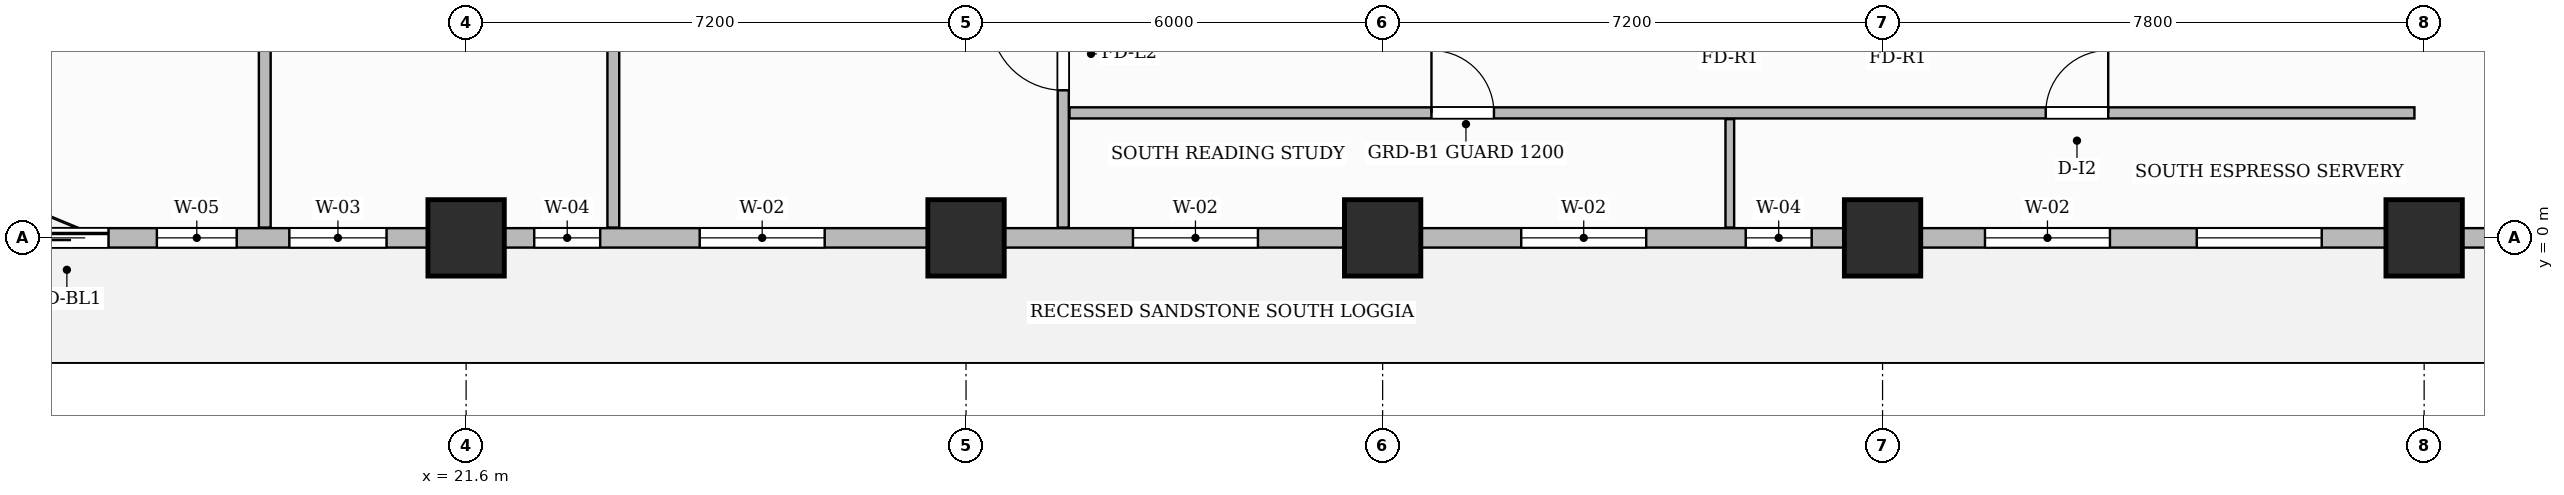
"""IFC4 building model, lengths in metres.
Left out: names, types, materials, properties, quantities, classifications, styles, units other than length and angle.
Written with IfcOpenShell. Run it as: python <this file> out.ifc"""

import sys

from ifc_helpers import new_model, si_unit, direction, frame, frame_2d, origin, origin_2d, place, context, subcontext, project, spatial, rectangle, extrude, source, transform, mapped, element, fill, save


model = new_model("IFC4")
c1 = context("Model", 3, precision=1e-05, world=origin(), true_north=direction((0.0, 1.0)))
c2 = subcontext(c1, "Body", "Model", "MODEL_VIEW")
j1 = project(units=[si_unit("LENGTHUNIT", "METRE"), si_unit("PLANEANGLEUNIT", "RADIAN")], contexts=[c1])
p1 = place(None, origin())
s1 = spatial("IfcSite", under=j1, at=p1, CompositionType="ELEMENT")
p2 = place(p1, origin())
s2 = spatial("IfcBuilding", under=s1, at=p2, CompositionType="ELEMENT")
p3 = place(p2, frame((0.0, 0.0, 102.7)))
s3 = spatial("IfcBuildingStorey", under=s2, at=p3, CompositionType="ELEMENT", Elevation=102.7)
m1 = source(origin(), c2, "Body", "SweptSolid", [
    extrude(rectangle(XDim=1.1, YDim=1.1, at=origin_2d()), origin(), (0.0, 0.0, 1.0), 3.7),
])
for number, where, z_axis, x_axis in (
    (1, (21.6, 0.0, 0.0), (0.0, 0.0, 1.0), (1.0, 0.0, 0.0)),
    (2, (28.8, 0.0, 0.0), (0.0, 0.0, 1.0), (1.0, 0.0, 0.0)),
    (3, (34.8, 0.0, 0.0), (0.0, 0.0, 1.0), (1.0, 0.0, 0.0)),
    (4, (42.0, 0.0, 0.0), (0.0, 0.0, 1.0), (1.0, 0.0, 0.0)),
    (5, (49.8, 0.0, 0.0), (0.0, 0.0, 1.0), (1.0, 0.0, 0.0)),
):
    element("IfcColumn", number, at=place(p3, frame(where, z_axis=z_axis, x_axis=x_axis)), inside=s3, PredefinedType="COLUMN", context=c2, shape_type="MappedRepresentation", body=[
        mapped(m1, transform((0.0, 0.0, 0.0), scale=1.0)),
    ])
p4 = place(p3, frame((30.2, 0.148, 0.0), z_axis=(0.0, 0.0, 1.0), x_axis=(0.0, 1.0, 0.0)))
e6 = element("IfcWall", 6, at=p4, inside=s3, PredefinedType="PARTITIONING", context=c2, shape_type="SweptSolid", body=[
    extrude(rectangle(XDim=8.912, YDim=0.16, at=frame_2d((4.456, 0.0))), origin(), (0.0, 0.0, 1.0), 3.4),
])
p5 = place(p4, frame((1.977, 0.0, 0.0)))
e7 = element("IfcOpeningElement", 7, at=p5, cuts=e6, PredefinedType="OPENING", context=c2, shape_type="SweptSolid", body=[
    extrude(rectangle(XDim=1.05, YDim=2.15, at=frame_2d((0.525, 1.075))), frame((0.0, 0.09, 0.0), z_axis=(0.0, -1.0, 0.0), x_axis=(1.0, 0.0, 0.0)), (0.0, 0.0, 1.0), 0.18),
])
p6 = place(p3, frame((30.29, 1.8, 0.0), z_axis=(0.0, 0.0, 1.0), x_axis=(1.0, 0.0, 0.0)))
e8 = element("IfcWall", 8, at=p6, inside=s3, PredefinedType="PARTITIONING", context=c2, shape_type="SweptSolid", body=[
    extrude(rectangle(XDim=19.37, YDim=0.16, at=frame_2d((9.685, 0.0))), origin(), (0.0, 0.0, 1.0), 3.4),
])
p7 = place(p6, frame((5.213, 0.0, 0.0)))
e9 = element("IfcOpeningElement", 9, at=p7, cuts=e8, PredefinedType="OPENING", context=c2, shape_type="SweptSolid", body=[
    extrude(rectangle(XDim=0.9, YDim=2.15, at=frame_2d((0.45, 1.075))), frame((0.0, 0.09, 0.0), z_axis=(0.0, -1.0, 0.0), x_axis=(1.0, 0.0, 0.0)), (0.0, 0.0, 1.0), 0.18),
])
p8 = place(p6, frame((14.06, 0.0, 0.0)))
e10 = element("IfcOpeningElement", 10, at=p8, cuts=e8, PredefinedType="OPENING", context=c2, shape_type="SweptSolid", body=[
    extrude(rectangle(XDim=0.9, YDim=2.15, at=frame_2d((0.45, 1.075))), frame((0.0, 0.09, 0.0), z_axis=(0.0, -1.0, 0.0), x_axis=(1.0, 0.0, 0.0)), (0.0, 0.0, 1.0), 0.18),
])
p9 = place(p3, frame((39.8, 0.148, 0.0), z_axis=(0.0, 0.0, 1.0), x_axis=(0.0, 1.0, 0.0)))
e11 = element("IfcWall", 11, at=p9, inside=s3, PredefinedType="PARTITIONING", context=c2, shape_type="SweptSolid", body=[
    extrude(rectangle(XDim=1.562, YDim=0.125, at=frame_2d((0.781, 0.0))), origin(), (0.0, 0.0, 1.0), 3.4),
])
for number, where, z_axis, x_axis in (
    (12, (18.7, 0.148, 0.0), (0.0, 0.0, 1.0), (0.0, 1.0, 0.0)),
    (13, (23.72, 0.148, 0.0), (0.0, 0.0, 1.0), (0.0, 1.0, 0.0)),
):
    element("IfcWall", number, at=place(p3, frame(where, z_axis=z_axis, x_axis=x_axis)), inside=s3, PredefinedType="PARTITIONING", context=c2, shape_type="SweptSolid", body=[
        extrude(rectangle(XDim=8.912, YDim=0.17, at=frame_2d((4.456, 0.0))), origin(), (0.0, 0.0, 1.0), 3.4),
    ])
p10 = place(p3, frame((14.4, 0.0, 0.0), z_axis=(0.0, 0.0, 1.0), x_axis=(1.0, 0.0, 0.0)))
e14 = element("IfcWall", 14, at=p10, inside=s3, PredefinedType="SOLIDWALL", context=c2, shape_type="SweptSolid", body=[
    extrude(rectangle(XDim=43.2, YDim=0.28, at=frame_2d((21.6, 0.0))), origin(), (0.0, 0.0, 1.0), 2.835),
])
p11 = place(p10, frame((0.85, 0.0, 0.0)))
e15 = element("IfcOpeningElement", 15, at=p11, cuts=e14, PredefinedType="OPENING", context=c2, shape_type="SweptSolid", body=[
    extrude(rectangle(XDim=1.2, YDim=2.2, at=frame_2d((0.6, 1.1))), frame((0.0, 0.15, 0.0), z_axis=(0.0, -1.0, 0.0), x_axis=(1.0, 0.0, 0.0)), (0.0, 0.0, 1.0), 0.3),
])
p12 = place(p10, frame((2.746, 0.0, 0.8)))
e16 = element("IfcOpeningElement", 16, at=p12, cuts=e14, PredefinedType="OPENING", context=c2, shape_type="SweptSolid", body=[
    extrude(rectangle(XDim=1.15, YDim=1.8, at=frame_2d((0.575, 0.9))), frame((0.0, 0.15, 0.0), z_axis=(0.0, -1.0, 0.0), x_axis=(1.0, 0.0, 0.0)), (0.0, 0.0, 1.0), 0.3),
])
p13 = place(p10, frame((4.654, 0.0, 0.8)))
e17 = element("IfcOpeningElement", 17, at=p13, cuts=e14, PredefinedType="OPENING", context=c2, shape_type="SweptSolid", body=[
    extrude(rectangle(XDim=1.4, YDim=1.85, at=frame_2d((0.7, 0.925))), frame((0.0, 0.15, 0.0), z_axis=(0.0, -1.0, 0.0), x_axis=(1.0, 0.0, 0.0)), (0.0, 0.0, 1.0), 0.3),
])
p14 = place(p10, frame((8.181, 0.0, 0.8)))
e18 = element("IfcOpeningElement", 18, at=p14, cuts=e14, PredefinedType="OPENING", context=c2, shape_type="SweptSolid", body=[
    extrude(rectangle(XDim=0.95, YDim=1.75, at=frame_2d((0.475, 0.875))), frame((0.0, 0.15, 0.0), z_axis=(0.0, -1.0, 0.0), x_axis=(1.0, 0.0, 0.0)), (0.0, 0.0, 1.0), 0.3),
])
p15 = place(p10, frame((10.564, 0.0, 0.8)))
e19 = element("IfcOpeningElement", 19, at=p15, cuts=e14, PredefinedType="OPENING", context=c2, shape_type="SweptSolid", body=[
    extrude(rectangle(XDim=1.8, YDim=1.85, at=frame_2d((0.9, 0.925))), frame((0.0, 0.15, 0.0), z_axis=(0.0, -1.0, 0.0), x_axis=(1.0, 0.0, 0.0)), (0.0, 0.0, 1.0), 0.3),
])
p16 = place(p10, frame((16.804, 0.0, 0.8)))
e20 = element("IfcOpeningElement", 20, at=p16, cuts=e14, PredefinedType="OPENING", context=c2, shape_type="SweptSolid", body=[
    extrude(rectangle(XDim=1.8, YDim=1.85, at=frame_2d((0.9, 0.925))), frame((0.0, 0.15, 0.0), z_axis=(0.0, -1.0, 0.0), x_axis=(1.0, 0.0, 0.0)), (0.0, 0.0, 1.0), 0.3),
])
p17 = place(p10, frame((22.396, 0.0, 0.8)))
e21 = element("IfcOpeningElement", 21, at=p17, cuts=e14, PredefinedType="OPENING", context=c2, shape_type="SweptSolid", body=[
    extrude(rectangle(XDim=1.8, YDim=1.85, at=frame_2d((0.9, 0.925))), frame((0.0, 0.15, 0.0), z_axis=(0.0, -1.0, 0.0), x_axis=(1.0, 0.0, 0.0)), (0.0, 0.0, 1.0), 0.3),
])
p18 = place(p10, frame((25.629, 0.0, 0.8)))
e22 = element("IfcOpeningElement", 22, at=p18, cuts=e14, PredefinedType="OPENING", context=c2, shape_type="SweptSolid", body=[
    extrude(rectangle(XDim=0.95, YDim=1.75, at=frame_2d((0.475, 0.875))), frame((0.0, 0.15, 0.0), z_axis=(0.0, -1.0, 0.0), x_axis=(1.0, 0.0, 0.0)), (0.0, 0.0, 1.0), 0.3),
])
p19 = place(p10, frame((29.075, 0.0, 0.8)))
e23 = element("IfcOpeningElement", 23, at=p19, cuts=e14, PredefinedType="OPENING", context=c2, shape_type="SweptSolid", body=[
    extrude(rectangle(XDim=1.8, YDim=1.85, at=frame_2d((0.9, 0.925))), frame((0.0, 0.15, 0.0), z_axis=(0.0, -1.0, 0.0), x_axis=(1.0, 0.0, 0.0)), (0.0, 0.0, 1.0), 0.3),
])
p20 = place(p10, frame((32.125, 0.0, 0.8)))
e24 = element("IfcOpeningElement", 24, at=p20, cuts=e14, PredefinedType="OPENING", context=c2, shape_type="SweptSolid", body=[
    extrude(rectangle(XDim=1.8, YDim=1.85, at=frame_2d((0.9, 0.925))), frame((0.0, 0.15, 0.0), z_axis=(0.0, -1.0, 0.0), x_axis=(1.0, 0.0, 0.0)), (0.0, 0.0, 1.0), 0.3),
])
p21 = place(p10, frame((36.946, 0.0, 0.8)))
e25 = element("IfcOpeningElement", 25, at=p21, cuts=e14, PredefinedType="OPENING", context=c2, shape_type="SweptSolid", body=[
    extrude(rectangle(XDim=1.8, YDim=1.85, at=frame_2d((0.9, 0.925))), frame((0.0, 0.15, 0.0), z_axis=(0.0, -1.0, 0.0), x_axis=(1.0, 0.0, 0.0)), (0.0, 0.0, 1.0), 0.3),
])
p22 = place(p10, frame((40.054, 0.0, 0.8)))
e26 = element("IfcOpeningElement", 26, at=p22, cuts=e14, PredefinedType="OPENING", context=c2, shape_type="SweptSolid", body=[
    extrude(rectangle(XDim=1.8, YDim=1.85, at=frame_2d((0.9, 0.925))), frame((0.0, 0.15, 0.0), z_axis=(0.0, -1.0, 0.0), x_axis=(1.0, 0.0, 0.0)), (0.0, 0.0, 1.0), 0.3),
])
m2 = source(origin(), c2, "Body", "SweptSolid", [
    extrude(rectangle(XDim=1.05, YDim=2.15, at=frame_2d((0.525, 1.075))), frame((0.0, 0.025, 0.0), z_axis=(0.0, -1.0, 0.0), x_axis=(1.0, 0.0, 0.0)), (0.0, 0.0, 1.0), 0.05),
])
p23 = place(p5, origin())
e27 = element("IfcDoor", 27, at=p23, inside=s3, OperationType="SINGLE_SWING_RIGHT", PredefinedType="DOOR", context=c2, shape_type="MappedRepresentation", body=[
    mapped(m2, transform((0.0, 0.0, 0.0), scale=1.0)),
])
fill(e7, e27)
m3 = source(origin(), c2, "Body", "SweptSolid", [
    extrude(rectangle(XDim=0.9, YDim=2.15, at=frame_2d((0.45, 1.075))), frame((0.0, 0.025, 0.0), z_axis=(0.0, -1.0, 0.0), x_axis=(1.0, 0.0, 0.0)), (0.0, 0.0, 1.0), 0.05),
])
p24 = place(p7, origin())
e28 = element("IfcDoor", 28, at=p24, inside=s3, OperationType="SINGLE_SWING_LEFT", PredefinedType="DOOR", context=c2, shape_type="MappedRepresentation", body=[
    mapped(m3, transform((0.0, 0.0, 0.0), scale=1.0)),
])
fill(e9, e28)
p25 = place(p8, origin())
e29 = element("IfcDoor", 29, at=p25, inside=s3, OperationType="SINGLE_SWING_RIGHT", PredefinedType="DOOR", context=c2, shape_type="MappedRepresentation", body=[
    mapped(m3, transform((0.0, 0.0, 0.0), scale=1.0)),
])
fill(e10, e29)
m4 = source(origin(), c2, "Body", "SweptSolid", [
    extrude(rectangle(XDim=1.2, YDim=2.2, at=frame_2d((0.6, 1.1))), frame((0.0, 0.025, 0.0), z_axis=(0.0, -1.0, 0.0), x_axis=(1.0, 0.0, 0.0)), (0.0, 0.0, 1.0), 0.05),
])
p26 = place(p11, origin())
e30 = element("IfcDoor", 30, at=p26, inside=s3, OperationType="SLIDING_TO_LEFT", PredefinedType="DOOR", context=c2, shape_type="MappedRepresentation", body=[
    mapped(m4, transform((0.0, 0.0, 0.0), scale=1.0)),
])
fill(e15, e30)
m5 = source(origin(), c2, "Body", "SweptSolid", [
    extrude(rectangle(XDim=1.15, YDim=1.8, at=frame_2d((0.575, 0.9))), frame((0.0, 0.03, 0.0), z_axis=(0.0, -1.0, 0.0), x_axis=(1.0, 0.0, 0.0)), (0.0, 0.0, 1.0), 0.06),
])
p27 = place(p12, origin())
e31 = element("IfcWindow", 31, at=p27, inside=s3, PartitioningType="SINGLE_PANEL", PredefinedType="WINDOW", context=c2, shape_type="MappedRepresentation", body=[
    mapped(m5, transform((0.0, 0.0, 0.0), scale=1.0)),
])
fill(e16, e31)
m6 = source(origin(), c2, "Body", "SweptSolid", [
    extrude(rectangle(XDim=1.4, YDim=1.85, at=frame_2d((0.7, 0.925))), frame((0.0, 0.03, 0.0), z_axis=(0.0, -1.0, 0.0), x_axis=(1.0, 0.0, 0.0)), (0.0, 0.0, 1.0), 0.06),
])
p28 = place(p13, origin())
e32 = element("IfcWindow", 32, at=p28, inside=s3, PartitioningType="SINGLE_PANEL", PredefinedType="WINDOW", context=c2, shape_type="MappedRepresentation", body=[
    mapped(m6, transform((0.0, 0.0, 0.0), scale=1.0)),
])
fill(e17, e32)
m7 = source(origin(), c2, "Body", "SweptSolid", [
    extrude(rectangle(XDim=0.95, YDim=1.75, at=frame_2d((0.475, 0.875))), frame((0.0, 0.03, 0.0), z_axis=(0.0, -1.0, 0.0), x_axis=(1.0, 0.0, 0.0)), (0.0, 0.0, 1.0), 0.06),
])
p29 = place(p14, origin())
e33 = element("IfcWindow", 33, at=p29, inside=s3, PartitioningType="SINGLE_PANEL", PredefinedType="WINDOW", context=c2, shape_type="MappedRepresentation", body=[
    mapped(m7, transform((0.0, 0.0, 0.0), scale=1.0)),
])
fill(e18, e33)
m8 = source(origin(), c2, "Body", "SweptSolid", [
    extrude(rectangle(XDim=1.8, YDim=1.85, at=frame_2d((0.9, 0.925))), frame((0.0, 0.03, 0.0), z_axis=(0.0, -1.0, 0.0), x_axis=(1.0, 0.0, 0.0)), (0.0, 0.0, 1.0), 0.06),
])
p30 = place(p15, origin())
e34 = element("IfcWindow", 34, at=p30, inside=s3, PartitioningType="DOUBLE_PANEL_VERTICAL", PredefinedType="WINDOW", context=c2, shape_type="MappedRepresentation", body=[
    mapped(m8, transform((0.0, 0.0, 0.0), scale=1.0)),
])
fill(e19, e34)
p31 = place(p16, origin())
e35 = element("IfcWindow", 35, at=p31, inside=s3, PartitioningType="DOUBLE_PANEL_VERTICAL", PredefinedType="WINDOW", context=c2, shape_type="MappedRepresentation", body=[
    mapped(m8, transform((0.0, 0.0, 0.0), scale=1.0)),
])
fill(e20, e35)
p32 = place(p17, origin())
e36 = element("IfcWindow", 36, at=p32, inside=s3, PartitioningType="DOUBLE_PANEL_VERTICAL", PredefinedType="WINDOW", context=c2, shape_type="MappedRepresentation", body=[
    mapped(m8, transform((0.0, 0.0, 0.0), scale=1.0)),
])
fill(e21, e36)
p33 = place(p18, origin())
e37 = element("IfcWindow", 37, at=p33, inside=s3, PartitioningType="SINGLE_PANEL", PredefinedType="WINDOW", context=c2, shape_type="MappedRepresentation", body=[
    mapped(m7, transform((0.0, 0.0, 0.0), scale=1.0)),
])
fill(e22, e37)
p34 = place(p19, origin())
e38 = element("IfcWindow", 38, at=p34, inside=s3, PartitioningType="DOUBLE_PANEL_VERTICAL", PredefinedType="WINDOW", context=c2, shape_type="MappedRepresentation", body=[
    mapped(m8, transform((0.0, 0.0, 0.0), scale=1.0)),
])
fill(e23, e38)
p35 = place(p20, origin())
e39 = element("IfcWindow", 39, at=p35, inside=s3, PartitioningType="DOUBLE_PANEL_VERTICAL", PredefinedType="WINDOW", context=c2, shape_type="MappedRepresentation", body=[
    mapped(m8, transform((0.0, 0.0, 0.0), scale=1.0)),
])
fill(e24, e39)
save(model, sys.argv[1])
